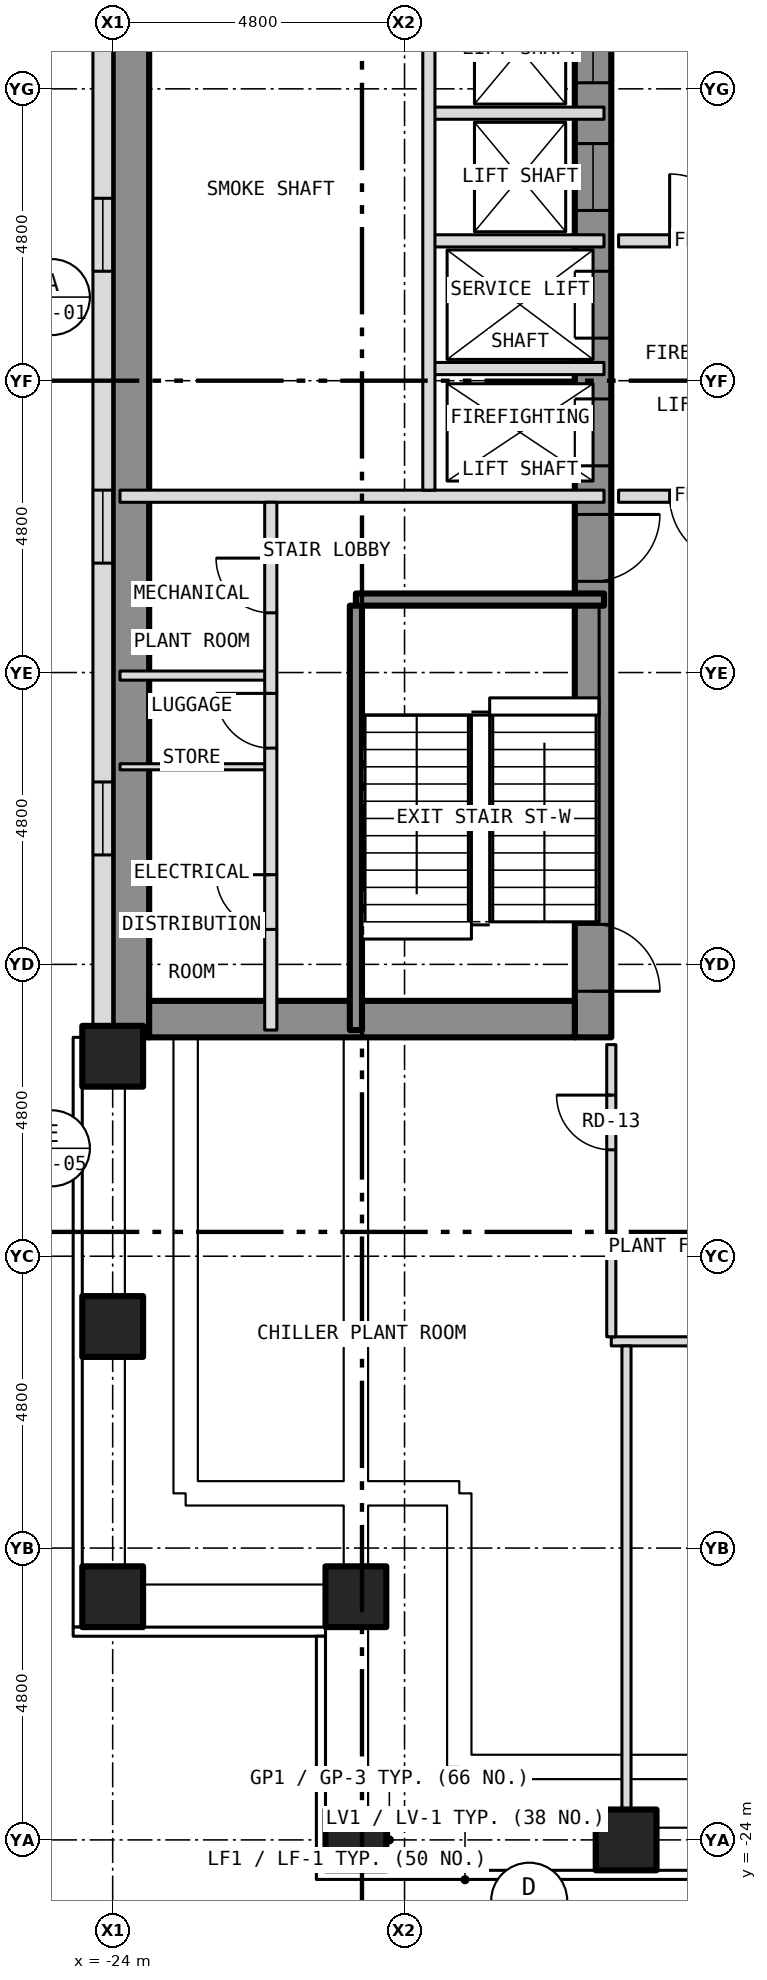
"""IFC4 building model, lengths in metres.
Left out: names, types, materials, properties, quantities, classifications, styles, units other than length and angle.
Written with IfcOpenShell. Run it as: python <this file> out.ifc"""

import sys

from ifc_helpers import new_model, si_unit, direction, frame, frame_2d, origin, origin_2d, place, context, subcontext, project, spatial, rectangle, hollow_rectangle, extrude, element, fill, save


model = new_model("IFC4")
c1 = context("Model", 3, precision=1e-05, world=origin(), true_north=direction((0.0, 1.0)))
c2 = subcontext(c1, "Body", "Model", "MODEL_VIEW")
j1 = project(units=[si_unit("LENGTHUNIT", "METRE"), si_unit("PLANEANGLEUNIT", "RADIAN")], contexts=[c1])
p1 = place(None, origin())
s1 = spatial("IfcSite", under=j1, at=p1, CompositionType="ELEMENT")
p2 = place(p1, origin())
s2 = spatial("IfcBuilding", under=s1, at=p2, CompositionType="ELEMENT")
p3 = place(p2, frame((0.0, 0.0, 84.5)))
s3 = spatial("IfcBuildingStorey", under=s2, at=p3, CompositionType="ELEMENT", Elevation=84.5)
for number, where, z_axis, x_axis in (
    (1, (-20.0, -24.0, -0.3), (0.0, 0.0, 1.0), (1.0, 0.0, 0.0)),
    (2, (-15.556, -24.0, -0.3), (0.0, 0.0, 1.0), (1.0, 0.0, 0.0)),
    (3, (-24.0, -20.0, -0.3), (0.0, 0.0, 1.0), (1.0, 0.0, 0.0)),
    (4, (-24.0, -15.556, -0.3), (0.0, 0.0, 1.0), (1.0, 0.0, 0.0)),
    (5, (-24.0, -11.111, -0.3), (0.0, 0.0, 1.0), (1.0, 0.0, 0.0)),
    (6, (-20.0, -20.0, -0.3), (0.0, 0.0, 1.0), (1.0, 0.0, 0.0)),
):
    element("IfcColumn", number, at=place(p3, frame(where, z_axis=z_axis, x_axis=x_axis)), inside=s3, PredefinedType="COLUMN", context=c2, shape_type="SweptSolid", body=[
        extrude(hollow_rectangle(XDim=1.0, YDim=1.0, WallThickness=0.06, at=origin_2d()), origin(), (0.0, 0.0, 1.0), 4.65),
    ])
p4 = place(p3, frame((-16.1, -10.8, 0.0), z_axis=(0.0, 0.0, 1.0), x_axis=(0.0, 1.0, 0.0)))
e7 = element("IfcWall", 7, at=p4, inside=s3, PredefinedType="SHEAR", context=c2, shape_type="SweptSolid", body=[
    extrude(rectangle(XDim=21.6, YDim=0.6, at=frame_2d((10.8, 0.0))), origin(), (0.0, 0.0, 1.0), 3.9),
])
p5 = place(p4, frame((9.4, 0.0, 0.0)))
e8 = element("IfcOpeningElement", 8, at=p5, cuts=e7, PredefinedType="OPENING", context=c2, shape_type="SweptSolid", body=[
    extrude(rectangle(XDim=1.1, YDim=2.1, at=frame_2d((0.55, 1.05))), frame((0.0, 0.312, 0.0), z_axis=(0.0, -1.0, 0.0), x_axis=(1.0, 0.0, 0.0)), (0.0, 0.0, 1.0), 0.624),
])
p6 = place(p4, frame((11.5, 0.0, 0.0)))
e9 = element("IfcOpeningElement", 9, at=p6, cuts=e7, PredefinedType="OPENING", context=c2, shape_type="SweptSolid", body=[
    extrude(rectangle(XDim=1.1, YDim=2.1, at=frame_2d((0.55, 1.05))), frame((0.0, 0.312, 0.0), z_axis=(0.0, -1.0, 0.0), x_axis=(1.0, 0.0, 0.0)), (0.0, 0.0, 1.0), 0.624),
])
p7 = place(p4, frame((13.6, 0.0, 0.0)))
e10 = element("IfcOpeningElement", 10, at=p7, cuts=e7, PredefinedType="OPENING", context=c2, shape_type="SweptSolid", body=[
    extrude(rectangle(XDim=1.1, YDim=2.1, at=frame_2d((0.55, 1.05))), frame((0.0, 0.312, 0.0), z_axis=(0.0, -1.0, 0.0), x_axis=(1.0, 0.0, 0.0)), (0.0, 0.0, 1.0), 0.624),
])
p8 = place(p4, frame((15.7, 0.0, 0.0)))
e11 = element("IfcOpeningElement", 11, at=p8, cuts=e7, PredefinedType="OPENING", context=c2, shape_type="SweptSolid", body=[
    extrude(rectangle(XDim=1.1, YDim=2.1, at=frame_2d((0.55, 1.05))), frame((0.0, 0.312, 0.0), z_axis=(0.0, -1.0, 0.0), x_axis=(1.0, 0.0, 0.0)), (0.0, 0.0, 1.0), 0.624),
])
p9 = place(p4, frame((17.8, 0.0, 0.0)))
e12 = element("IfcOpeningElement", 12, at=p9, cuts=e7, PredefinedType="OPENING", context=c2, shape_type="SweptSolid", body=[
    extrude(rectangle(XDim=1.1, YDim=2.1, at=frame_2d((0.55, 1.05))), frame((0.0, 0.312, 0.0), z_axis=(0.0, -1.0, 0.0), x_axis=(1.0, 0.0, 0.0)), (0.0, 0.0, 1.0), 0.624),
])
p10 = place(p4, frame((0.758, 0.0, 0.0)))
e13 = element("IfcOpeningElement", 13, at=p10, cuts=e7, PredefinedType="OPENING", context=c2, shape_type="SweptSolid", body=[
    extrude(rectangle(XDim=1.1, YDim=2.1, at=frame_2d((0.55, 1.05))), frame((0.0, 0.312, 0.0), z_axis=(0.0, -1.0, 0.0), x_axis=(1.0, 0.0, 0.0)), (0.0, 0.0, 1.0), 0.624),
])
p11 = place(p4, frame((7.5, 0.0, 0.0)))
e14 = element("IfcOpeningElement", 14, at=p11, cuts=e7, PredefinedType="OPENING", context=c2, shape_type="SweptSolid", body=[
    extrude(rectangle(XDim=1.1, YDim=2.1, at=frame_2d((0.55, 1.05))), frame((0.0, 0.312, 0.0), z_axis=(0.0, -1.0, 0.0), x_axis=(1.0, 0.0, 0.0)), (0.0, 0.0, 1.0), 0.624),
])
p12 = place(p3, frame((-23.7, -10.8, 0.0), z_axis=(0.0, 0.0, 1.0), x_axis=(0.0, 1.0, 0.0)))
e15 = element("IfcWall", 15, at=p12, inside=s3, PredefinedType="SHEAR", context=c2, shape_type="SweptSolid", body=[
    extrude(rectangle(XDim=21.6, YDim=0.6, at=frame_2d((10.8, 0.0))), origin(), (0.0, 0.0, 1.0), 3.9),
])
p13 = place(p3, frame((-23.4, -10.5, 0.0), z_axis=(0.0, 0.0, 1.0), x_axis=(1.0, 0.0, 0.0)))
e16 = element("IfcWall", 16, at=p13, inside=s3, PredefinedType="SHEAR", context=c2, shape_type="SweptSolid", body=[
    extrude(rectangle(XDim=7.0, YDim=0.6, at=frame_2d((3.5, 0.0))), origin(), (0.0, 0.0, 1.0), 3.9),
])
p14 = place(p3, frame((-24.163, 10.8, 0.0), z_axis=(0.0, 0.0, 1.0), x_axis=(0.0, -1.0, 0.0)))
e17 = element("IfcWall", 17, at=p14, inside=s3, PredefinedType="SOLIDWALL", context=c2, shape_type="SweptSolid", body=[
    extrude(rectangle(XDim=21.6, YDim=0.325, at=frame_2d((10.8, 0.0))), origin(), (0.0, 0.0, 1.0), 4.5),
])
p15 = place(p14, frame((3.0, 0.0, 2.2)))
e18 = element("IfcOpeningElement", 18, at=p15, cuts=e17, PredefinedType="OPENING", context=c2, shape_type="SweptSolid", body=[
    extrude(rectangle(XDim=1.2, YDim=0.6, at=frame_2d((0.6, 0.3))), frame((0.0, 0.175, 0.0), z_axis=(0.0, -1.0, 0.0), x_axis=(1.0, 0.0, 0.0)), (0.0, 0.0, 1.0), 0.349),
])
p16 = place(p14, frame((7.8, 0.0, 2.2)))
e19 = element("IfcOpeningElement", 19, at=p16, cuts=e17, PredefinedType="OPENING", context=c2, shape_type="SweptSolid", body=[
    extrude(rectangle(XDim=1.2, YDim=0.6, at=frame_2d((0.6, 0.3))), frame((0.0, 0.175, 0.0), z_axis=(0.0, -1.0, 0.0), x_axis=(1.0, 0.0, 0.0)), (0.0, 0.0, 1.0), 0.349),
])
p17 = place(p14, frame((12.6, 0.0, 2.2)))
e20 = element("IfcOpeningElement", 20, at=p17, cuts=e17, PredefinedType="OPENING", context=c2, shape_type="SweptSolid", body=[
    extrude(rectangle(XDim=1.2, YDim=0.6, at=frame_2d((0.6, 0.3))), frame((0.0, 0.175, 0.0), z_axis=(0.0, -1.0, 0.0), x_axis=(1.0, 0.0, 0.0)), (0.0, 0.0, 1.0), 0.349),
])
p18 = place(p14, frame((17.4, 0.0, 2.2)))
e21 = element("IfcOpeningElement", 21, at=p18, cuts=e17, PredefinedType="OPENING", context=c2, shape_type="SweptSolid", body=[
    extrude(rectangle(XDim=1.2, YDim=0.6, at=frame_2d((0.6, 0.3))), frame((0.0, 0.175, 0.0), z_axis=(0.0, -1.0, 0.0), x_axis=(1.0, 0.0, 0.0)), (0.0, 0.0, 1.0), 0.349),
])
p19 = place(p3, frame((-15.8, -15.8, 0.0), z_axis=(0.0, 0.0, 1.0), x_axis=(1.0, 0.0, 0.0)))
e22 = element("IfcWall", 22, at=p19, inside=s3, PredefinedType="PARTITIONING", context=c2, shape_type="SweptSolid", body=[
    extrude(rectangle(XDim=31.6, YDim=0.15, at=frame_2d((15.8, 0.0))), origin(), (0.0, 0.0, 1.0), 4.35),
])
p20 = place(p19, frame((4.98, 0.0, 0.0)))
e23 = element("IfcOpeningElement", 23, at=p20, cuts=e22, PredefinedType="OPENING", context=c2, shape_type="SweptSolid", body=[
    extrude(rectangle(XDim=0.9, YDim=2.1, at=frame_2d((0.45, 1.05))), frame((0.0, 0.087, 0.0), z_axis=(0.0, -1.0, 0.0), x_axis=(1.0, 0.0, 0.0)), (0.0, 0.0, 1.0), 0.174),
])
p21 = place(p19, frame((15.35, 0.0, 0.0)))
e24 = element("IfcOpeningElement", 24, at=p21, cuts=e22, PredefinedType="OPENING", context=c2, shape_type="SweptSolid", body=[
    extrude(rectangle(XDim=0.9, YDim=2.1, at=frame_2d((0.45, 1.05))), frame((0.0, 0.087, 0.0), z_axis=(0.0, -1.0, 0.0), x_axis=(1.0, 0.0, 0.0)), (0.0, 0.0, 1.0), 0.174),
])
p22 = place(p19, frame((25.721, 0.0, 0.0)))
e25 = element("IfcOpeningElement", 25, at=p22, cuts=e22, PredefinedType="OPENING", context=c2, shape_type="SweptSolid", body=[
    extrude(rectangle(XDim=0.9, YDim=2.1, at=frame_2d((0.45, 1.05))), frame((0.0, 0.087, 0.0), z_axis=(0.0, -1.0, 0.0), x_axis=(1.0, 0.0, 0.0)), (0.0, 0.0, 1.0), 0.174),
])
p23 = place(p3, frame((-23.88, -6.35, 0.0), z_axis=(0.0, 0.0, 1.0), x_axis=(1.0, 0.0, 0.0)))
e26 = element("IfcWall", 26, at=p23, inside=s3, PredefinedType="PARTITIONING", context=c2, shape_type="SweptSolid", body=[
    extrude(rectangle(XDim=2.48, YDim=0.1, at=frame_2d((1.24, 0.0))), origin(), (0.0, 0.0, 1.0), 3.9),
])
p24 = place(p3, frame((-23.88, -4.85, 0.0), z_axis=(0.0, 0.0, 1.0), x_axis=(1.0, 0.0, 0.0)))
e27 = element("IfcWall", 27, at=p24, inside=s3, PredefinedType="PARTITIONING", context=c2, shape_type="SweptSolid", body=[
    extrude(rectangle(XDim=2.48, YDim=0.15, at=frame_2d((1.24, 0.0))), origin(), (0.0, 0.0, 1.0), 3.9),
])
p25 = place(p3, frame((-20.0, -3.6, 0.0), z_axis=(0.0, 0.0, 1.0), x_axis=(1.0, 0.0, 0.0)))
e28 = element("IfcWall", 28, at=p25, inside=s3, PredefinedType="SHEAR", context=c2, shape_type="SweptSolid", body=[
    extrude(rectangle(XDim=4.08, YDim=0.2, at=frame_2d((2.04, 0.0))), origin(), (0.0, 0.0, 1.0), 3.9),
])
p26 = place(p3, frame((-23.88, -1.9, 0.0), z_axis=(0.0, 0.0, 1.0), x_axis=(1.0, 0.0, 0.0)))
e29 = element("IfcWall", 29, at=p26, inside=s3, PredefinedType="PARTITIONING", context=c2, shape_type="SweptSolid", body=[
    extrude(rectangle(XDim=7.96, YDim=0.2, at=frame_2d((3.98, 0.0))), origin(), (0.0, 0.0, 1.0), 3.9),
])
p27 = place(p3, frame((-15.68, -1.9, 0.0), z_axis=(0.0, 0.0, 1.0), x_axis=(1.0, 0.0, 0.0)))
e30 = element("IfcWall", 30, at=p27, inside=s3, PredefinedType="PARTITIONING", context=c2, shape_type="SweptSolid", body=[
    extrude(rectangle(XDim=3.28, YDim=0.2, at=frame_2d((1.64, 0.0))), origin(), (0.0, 0.0, 1.0), 4.35),
])
p28 = place(p27, frame((0.84, 0.0, 0.0)))
e31 = element("IfcOpeningElement", 31, at=p28, cuts=e30, PredefinedType="OPENING", context=c2, shape_type="SweptSolid", body=[
    extrude(rectangle(XDim=1.1, YDim=2.1, at=frame_2d((0.55, 1.05))), frame((0.0, 0.112, 0.0), z_axis=(0.0, -1.0, 0.0), x_axis=(1.0, 0.0, 0.0)), (0.0, 0.0, 1.0), 0.224),
])
for number, where, z_axis, x_axis in (
    (32, (-18.8, 0.2, 0.0), (0.0, 0.0, 1.0), (1.0, 0.0, 0.0)),
    (33, (-18.8, 2.3, 0.0), (0.0, 0.0, 1.0), (1.0, 0.0, 0.0)),
):
    element("IfcWall", number, at=place(p3, frame(where, z_axis=z_axis, x_axis=x_axis)), inside=s3, PredefinedType="PARTITIONING", context=c2, shape_type="SweptSolid", body=[
        extrude(rectangle(XDim=2.88, YDim=0.2, at=frame_2d((1.44, 0.0))), origin(), (0.0, 0.0, 1.0), 3.9),
    ])
p29 = place(p3, frame((-15.68, 2.3, 0.0), z_axis=(0.0, 0.0, 1.0), x_axis=(1.0, 0.0, 0.0)))
e34 = element("IfcWall", 34, at=p29, inside=s3, PredefinedType="PARTITIONING", context=c2, shape_type="SweptSolid", body=[
    extrude(rectangle(XDim=3.28, YDim=0.2, at=frame_2d((1.64, 0.0))), origin(), (0.0, 0.0, 1.0), 4.35),
])
p30 = place(p29, frame((0.84, 0.0, 0.0)))
e35 = element("IfcOpeningElement", 35, at=p30, cuts=e34, PredefinedType="OPENING", context=c2, shape_type="SweptSolid", body=[
    extrude(rectangle(XDim=1.1, YDim=2.1, at=frame_2d((0.55, 1.05))), frame((0.0, 0.112, 0.0), z_axis=(0.0, -1.0, 0.0), x_axis=(1.0, 0.0, 0.0)), (0.0, 0.0, 1.0), 0.224),
])
p31 = place(p3, frame((-18.8, 4.4, 0.0), z_axis=(0.0, 0.0, 1.0), x_axis=(1.0, 0.0, 0.0)))
e36 = element("IfcWall", 36, at=p31, inside=s3, PredefinedType="PARTITIONING", context=c2, shape_type="SweptSolid", body=[
    extrude(rectangle(XDim=2.88, YDim=0.2, at=frame_2d((1.44, 0.0))), origin(), (0.0, 0.0, 1.0), 3.9),
])
p32 = place(p3, frame((-21.4, -10.68, 0.0), z_axis=(0.0, 0.0, 1.0), x_axis=(0.0, 1.0, 0.0)))
e37 = element("IfcWall", 37, at=p32, inside=s3, PredefinedType="PARTITIONING", context=c2, shape_type="SweptSolid", body=[
    extrude(rectangle(XDim=8.68, YDim=0.2, at=frame_2d((4.34, 0.0))), origin(), (0.0, 0.0, 1.0), 3.9),
])
p33 = place(p32, frame((1.655, 0.0, 0.0)))
e38 = element("IfcOpeningElement", 38, at=p33, cuts=e37, PredefinedType="OPENING", context=c2, shape_type="SweptSolid", body=[
    extrude(rectangle(XDim=0.9, YDim=2.1, at=frame_2d((0.45, 1.05))), frame((0.0, 0.112, 0.0), z_axis=(0.0, -1.0, 0.0), x_axis=(1.0, 0.0, 0.0)), (0.0, 0.0, 1.0), 0.224),
])
p34 = place(p32, frame((4.637, 0.0, 0.0)))
e39 = element("IfcOpeningElement", 39, at=p34, cuts=e37, PredefinedType="OPENING", context=c2, shape_type="SweptSolid", body=[
    extrude(rectangle(XDim=0.9, YDim=2.1, at=frame_2d((0.45, 1.05))), frame((0.0, 0.112, 0.0), z_axis=(0.0, -1.0, 0.0), x_axis=(1.0, 0.0, 0.0)), (0.0, 0.0, 1.0), 0.224),
])
p35 = place(p32, frame((6.862, 0.0, 0.0)))
e40 = element("IfcOpeningElement", 40, at=p35, cuts=e37, PredefinedType="OPENING", context=c2, shape_type="SweptSolid", body=[
    extrude(rectangle(XDim=0.9, YDim=2.1, at=frame_2d((0.45, 1.05))), frame((0.0, 0.112, 0.0), z_axis=(0.0, -1.0, 0.0), x_axis=(1.0, 0.0, 0.0)), (0.0, 0.0, 1.0), 0.224),
])
p36 = place(p3, frame((-20.0, -10.68, 0.0), z_axis=(0.0, 0.0, 1.0), x_axis=(0.0, 1.0, 0.0)))
e41 = element("IfcWall", 41, at=p36, inside=s3, PredefinedType="SHEAR", context=c2, shape_type="SweptSolid", body=[
    extrude(rectangle(XDim=6.98, YDim=0.2, at=frame_2d((3.49, 0.0))), origin(), (0.0, 0.0, 1.0), 3.9),
])
p37 = place(p3, frame((-18.8, -1.8, 0.0), z_axis=(0.0, 0.0, 1.0), x_axis=(0.0, 1.0, 0.0)))
e42 = element("IfcWall", 42, at=p37, inside=s3, PredefinedType="PARTITIONING", context=c2, shape_type="SweptSolid", body=[
    extrude(rectangle(XDim=12.48, YDim=0.2, at=frame_2d((6.24, 0.0))), origin(), (0.0, 0.0, 1.0), 3.9),
])
p38 = place(p3, frame((-15.8, -15.725, 0.0), z_axis=(0.0, 0.0, 1.0), x_axis=(0.0, 1.0, 0.0)))
e43 = element("IfcWall", 43, at=p38, inside=s3, PredefinedType="PARTITIONING", context=c2, shape_type="SweptSolid", body=[
    extrude(rectangle(XDim=4.805, YDim=0.15, at=frame_2d((2.403, 0.0))), origin(), (0.0, 0.0, 1.0), 4.35),
])
p39 = place(p38, frame((3.075, 0.0, 0.0)))
e44 = element("IfcOpeningElement", 44, at=p39, cuts=e43, PredefinedType="OPENING", context=c2, shape_type="SweptSolid", body=[
    extrude(rectangle(XDim=0.9, YDim=2.1, at=frame_2d((0.45, 1.05))), frame((0.0, 0.087, 0.0), z_axis=(0.0, -1.0, 0.0), x_axis=(1.0, 0.0, 0.0)), (0.0, 0.0, 1.0), 0.174),
])
p40 = place(p3, frame((-15.55, -23.88, 0.0), z_axis=(0.0, 0.0, 1.0), x_axis=(0.0, 1.0, 0.0)))
e45 = element("IfcWall", 45, at=p40, inside=s3, PredefinedType="PARTITIONING", context=c2, shape_type="SweptSolid", body=[
    extrude(rectangle(XDim=8.005, YDim=0.15, at=frame_2d((4.002, 0.0))), origin(), (0.0, 0.0, 1.0), 4.35),
])
p41 = place(p16, origin())
e46 = element("IfcWindow", 46, at=p41, inside=s3, PartitioningType="SINGLE_PANEL", PredefinedType="WINDOW", context=c2, shape_type="SweptSolid", body=[
    extrude(rectangle(XDim=1.2, YDim=0.6, at=frame_2d((0.6, 0.3))), frame((0.0, -0.073, 0.0), z_axis=(0.0, -1.0, 0.0), x_axis=(1.0, 0.0, 0.0)), (0.0, 0.0, 1.0), 0.06),
])
fill(e19, e46)
p42 = place(p17, origin())
e47 = element("IfcWindow", 47, at=p42, inside=s3, PartitioningType="SINGLE_PANEL", PredefinedType="WINDOW", context=c2, shape_type="SweptSolid", body=[
    extrude(rectangle(XDim=1.2, YDim=0.6, at=frame_2d((0.6, 0.3))), frame((0.0, -0.073, 0.0), z_axis=(0.0, -1.0, 0.0), x_axis=(1.0, 0.0, 0.0)), (0.0, 0.0, 1.0), 0.06),
])
fill(e20, e47)
p43 = place(p18, origin())
e48 = element("IfcWindow", 48, at=p43, inside=s3, PartitioningType="SINGLE_PANEL", PredefinedType="WINDOW", context=c2, shape_type="SweptSolid", body=[
    extrude(rectangle(XDim=1.2, YDim=0.6, at=frame_2d((0.6, 0.3))), frame((0.0, -0.073, 0.0), z_axis=(0.0, -1.0, 0.0), x_axis=(1.0, 0.0, 0.0)), (0.0, 0.0, 1.0), 0.06),
])
fill(e21, e48)
p44 = place(p5, origin())
e49 = element("IfcDoor", 49, at=p44, inside=s3, OperationType="SLIDING_TO_LEFT", PredefinedType="DOOR", context=c2, shape_type="SweptSolid", body=[
    extrude(rectangle(XDim=1.1, YDim=2.1, at=frame_2d((0.55, 1.05))), frame((0.0, 0.025, 0.0), z_axis=(0.0, -1.0, 0.0), x_axis=(1.0, 0.0, 0.0)), (0.0, 0.0, 1.0), 0.05),
])
fill(e8, e49)
p45 = place(p6, origin())
e50 = element("IfcDoor", 50, at=p45, inside=s3, OperationType="SLIDING_TO_LEFT", PredefinedType="DOOR", context=c2, shape_type="SweptSolid", body=[
    extrude(rectangle(XDim=1.1, YDim=2.1, at=frame_2d((0.55, 1.05))), frame((0.0, 0.025, 0.0), z_axis=(0.0, -1.0, 0.0), x_axis=(1.0, 0.0, 0.0)), (0.0, 0.0, 1.0), 0.05),
])
fill(e9, e50)
p46 = place(p7, origin())
e51 = element("IfcDoor", 51, at=p46, inside=s3, OperationType="SLIDING_TO_LEFT", PredefinedType="DOOR", context=c2, shape_type="SweptSolid", body=[
    extrude(rectangle(XDim=1.1, YDim=2.1, at=frame_2d((0.55, 1.05))), frame((0.0, 0.025, 0.0), z_axis=(0.0, -1.0, 0.0), x_axis=(1.0, 0.0, 0.0)), (0.0, 0.0, 1.0), 0.05),
])
fill(e10, e51)
p47 = place(p8, origin())
e52 = element("IfcDoor", 52, at=p47, inside=s3, OperationType="SLIDING_TO_LEFT", PredefinedType="DOOR", context=c2, shape_type="SweptSolid", body=[
    extrude(rectangle(XDim=1.1, YDim=2.1, at=frame_2d((0.55, 1.05))), frame((0.0, 0.025, 0.0), z_axis=(0.0, -1.0, 0.0), x_axis=(1.0, 0.0, 0.0)), (0.0, 0.0, 1.0), 0.05),
])
fill(e11, e52)
p48 = place(p10, origin())
e53 = element("IfcDoor", 53, at=p48, inside=s3, OperationType="SINGLE_SWING_LEFT", PredefinedType="DOOR", context=c2, shape_type="SweptSolid", body=[
    extrude(rectangle(XDim=1.1, YDim=2.1, at=frame_2d((0.55, 1.05))), frame((0.0, 0.025, 0.0), z_axis=(0.0, -1.0, 0.0), x_axis=(1.0, 0.0, 0.0)), (0.0, 0.0, 1.0), 0.05),
])
fill(e13, e53)
p49 = place(p11, origin())
e54 = element("IfcDoor", 54, at=p49, inside=s3, OperationType="SINGLE_SWING_RIGHT", PredefinedType="DOOR", context=c2, shape_type="SweptSolid", body=[
    extrude(rectangle(XDim=1.1, YDim=2.1, at=frame_2d((0.55, 1.05))), frame((0.0, 0.025, 0.0), z_axis=(0.0, -1.0, 0.0), x_axis=(1.0, 0.0, 0.0)), (0.0, 0.0, 1.0), 0.05),
])
fill(e14, e54)
p50 = place(p33, origin())
e55 = element("IfcDoor", 55, at=p50, inside=s3, OperationType="SINGLE_SWING_RIGHT", PredefinedType="DOOR", context=c2, shape_type="SweptSolid", body=[
    extrude(rectangle(XDim=0.9, YDim=2.1, at=frame_2d((0.45, 1.05))), frame((0.0, 0.025, 0.0), z_axis=(0.0, -1.0, 0.0), x_axis=(1.0, 0.0, 0.0)), (0.0, 0.0, 1.0), 0.05),
])
fill(e38, e55)
p51 = place(p34, origin())
e56 = element("IfcDoor", 56, at=p51, inside=s3, OperationType="SINGLE_SWING_RIGHT", PredefinedType="DOOR", context=c2, shape_type="SweptSolid", body=[
    extrude(rectangle(XDim=0.9, YDim=2.1, at=frame_2d((0.45, 1.05))), frame((0.0, 0.025, 0.0), z_axis=(0.0, -1.0, 0.0), x_axis=(1.0, 0.0, 0.0)), (0.0, 0.0, 1.0), 0.05),
])
fill(e39, e56)
p52 = place(p35, origin())
e57 = element("IfcDoor", 57, at=p52, inside=s3, OperationType="SINGLE_SWING_RIGHT", PredefinedType="DOOR", context=c2, shape_type="SweptSolid", body=[
    extrude(rectangle(XDim=0.9, YDim=2.1, at=frame_2d((0.45, 1.05))), frame((0.0, 0.025, 0.0), z_axis=(0.0, -1.0, 0.0), x_axis=(1.0, 0.0, 0.0)), (0.0, 0.0, 1.0), 0.05),
])
fill(e40, e57)
p53 = place(p30, origin())
e58 = element("IfcDoor", 58, at=p53, inside=s3, OperationType="SINGLE_SWING_LEFT", PredefinedType="DOOR", context=c2, shape_type="SweptSolid", body=[
    extrude(rectangle(XDim=1.1, YDim=2.1, at=frame_2d((0.55, 1.05))), frame((0.0, 0.025, 0.0), z_axis=(0.0, -1.0, 0.0), x_axis=(1.0, 0.0, 0.0)), (0.0, 0.0, 1.0), 0.05),
])
fill(e35, e58)
p54 = place(p28, origin())
e59 = element("IfcDoor", 59, at=p54, inside=s3, OperationType="SINGLE_SWING_RIGHT", PredefinedType="DOOR", context=c2, shape_type="SweptSolid", body=[
    extrude(rectangle(XDim=1.1, YDim=2.1, at=frame_2d((0.55, 1.05))), frame((0.0, 0.025, 0.0), z_axis=(0.0, -1.0, 0.0), x_axis=(1.0, 0.0, 0.0)), (0.0, 0.0, 1.0), 0.05),
])
fill(e31, e59)
p55 = place(p39, origin())
e60 = element("IfcDoor", 60, at=p55, inside=s3, OperationType="SINGLE_SWING_RIGHT", PredefinedType="DOOR", context=c2, shape_type="SweptSolid", body=[
    extrude(rectangle(XDim=0.9, YDim=2.1, at=frame_2d((0.45, 1.05))), frame((0.0, 0.025, 0.0), z_axis=(0.0, -1.0, 0.0), x_axis=(1.0, 0.0, 0.0)), (0.0, 0.0, 1.0), 0.05),
])
fill(e44, e60)
save(model, sys.argv[1])
